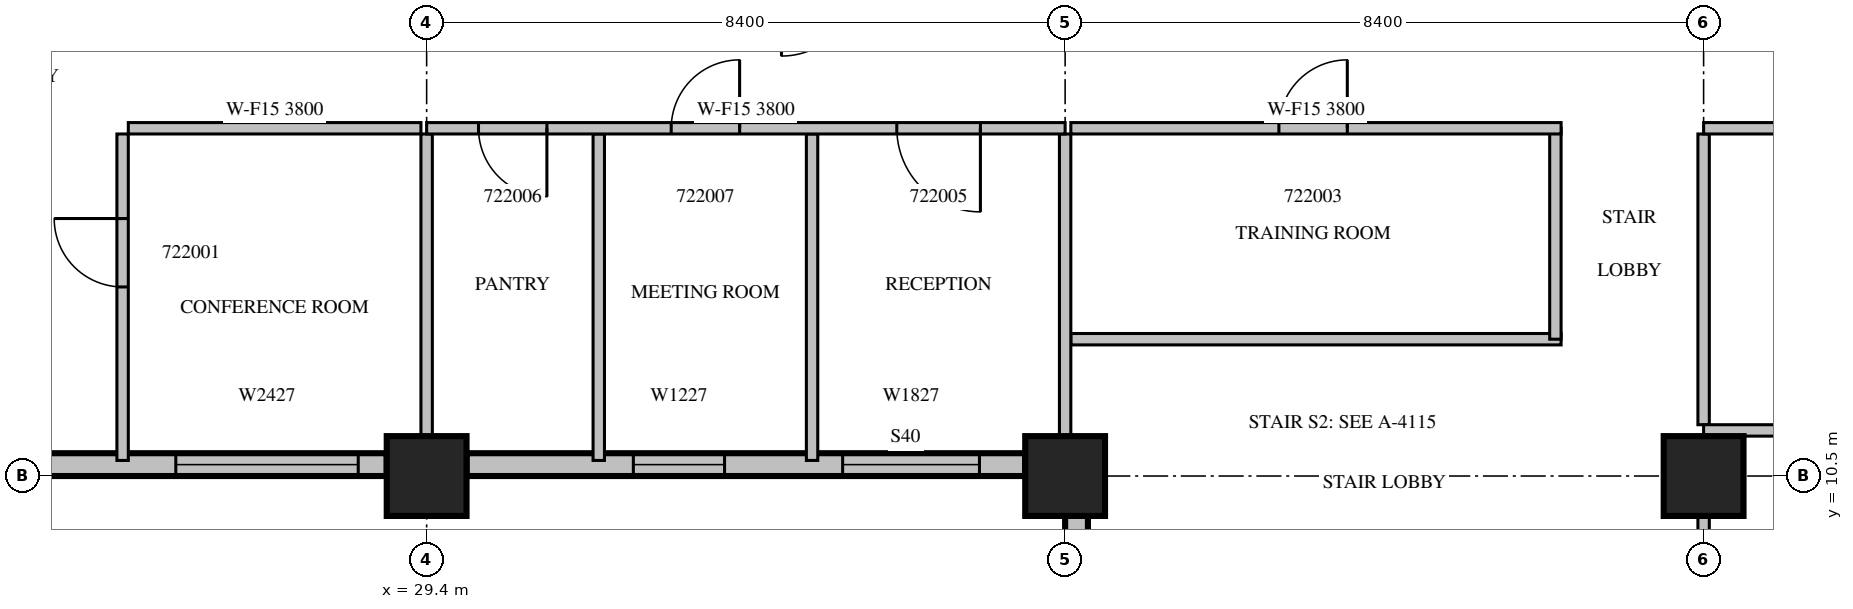
"""IFC4 building model, lengths in metres.
Left out: names, types, materials, properties, quantities, classifications, styles, units other than length and angle.
Written with IfcOpenShell. Run it as: python <this file> out.ifc"""

import sys

from ifc_helpers import new_model, si_unit, direction, frame, frame_2d, origin, origin_2d, place, context, subcontext, project, spatial, rectangle, extrude, source, transform, mapped, element, fill, save


model = new_model("IFC4")
c1 = context("Model", 3, precision=1e-05, world=origin(), true_north=direction((0.0, 1.0)))
c2 = subcontext(c1, "Body", "Model", "MODEL_VIEW")
j1 = project(units=[si_unit("LENGTHUNIT", "METRE"), si_unit("PLANEANGLEUNIT", "RADIAN")], contexts=[c1])
p1 = place(None, origin())
s1 = spatial("IfcSite", under=j1, at=p1, CompositionType="ELEMENT")
p2 = place(p1, origin())
s2 = spatial("IfcBuilding", under=s1, at=p2, CompositionType="ELEMENT")
p3 = place(p2, frame((0.0, 0.0, 103.5)))
s3 = spatial("IfcBuildingStorey", under=s2, at=p3, CompositionType="ELEMENT", Elevation=103.5)
m1 = source(origin(), c2, "Body", "SweptSolid", [
    extrude(rectangle(XDim=1.05, YDim=1.05, at=origin_2d()), origin(), (0.0, 0.0, 1.0), 4.2),
])
for number, where, z_axis, x_axis in (
    (1, (29.4, 10.5, 0.0), (0.0, 0.0, 1.0), (1.0, 0.0, 0.0)),
    (2, (37.8, 10.5, 0.0), (0.0, 0.0, 1.0), (1.0, 0.0, 0.0)),
    (3, (46.2, 10.5, 0.0), (0.0, 0.0, 1.0), (1.0, 0.0, 0.0)),
):
    element("IfcColumn", number, at=place(p3, frame(where, z_axis=z_axis, x_axis=x_axis)), inside=s3, PredefinedType="COLUMN", context=c2, shape_type="MappedRepresentation", body=[
        mapped(m1, transform((0.0, 0.0, 0.0), scale=1.0)),
    ])
p4 = place(p3, frame((22.0, 10.65, 0.0), z_axis=(0.0, 0.0, 1.0), x_axis=(1.0, 0.0, 0.0)))
e4 = element("IfcWall", 4, at=p4, inside=s3, PredefinedType="STANDARD", context=c2, shape_type="SweptSolid", body=[
    extrude(rectangle(XDim=6.875, YDim=0.3, at=frame_2d((3.438, 0.0))), origin(), (0.0, 0.0, 1.0), 3.8),
])
m2 = source(origin(), c2, "Body", "SweptSolid", [
    extrude(rectangle(XDim=1.8, YDim=2.7, at=frame_2d((0.9, 1.35))), frame((0.0, 0.16, 0.0), z_axis=(0.0, -1.0, 0.0), x_axis=(1.0, 0.0, 0.0)), (0.0, 0.0, 1.0), 0.32),
])
p5 = place(p4, frame((0.2, 0.0, 0.6)))
e5 = element("IfcOpeningElement", 5, at=p5, cuts=e4, PredefinedType="OPENING", context=c2, shape_type="MappedRepresentation", body=[
    mapped(m2, transform((0.0, 0.0, 0.0), scale=1.0)),
])
m3 = source(origin(), c2, "Body", "SweptSolid", [
    extrude(rectangle(XDim=2.4, YDim=2.7, at=frame_2d((1.2, 1.35))), frame((0.0, 0.16, 0.0), z_axis=(0.0, -1.0, 0.0), x_axis=(1.0, 0.0, 0.0)), (0.0, 0.0, 1.0), 0.32),
])
p6 = place(p4, frame((4.1, 0.0, 0.6)))
e6 = element("IfcOpeningElement", 6, at=p6, cuts=e4, PredefinedType="OPENING", context=c2, shape_type="MappedRepresentation", body=[
    mapped(m3, transform((0.0, 0.0, 0.0), scale=1.0)),
])
m4 = source(origin(), c2, "Body", "SweptSolid", [
    extrude(rectangle(XDim=7.35, YDim=0.3, at=frame_2d((3.675, 0.0))), origin(), (0.0, 0.0, 1.0), 3.8),
])
p7 = place(p3, frame((29.925, 10.65, 0.0), z_axis=(0.0, 0.0, 1.0), x_axis=(1.0, 0.0, 0.0)))
e7 = element("IfcWall", 7, at=p7, inside=s3, PredefinedType="STANDARD", context=c2, shape_type="MappedRepresentation", body=[
    mapped(m4, transform((0.0, 0.0, 0.0), scale=1.0)),
])
p8 = place(p7, frame((4.948, 0.0, 0.6)))
e8 = element("IfcOpeningElement", 8, at=p8, cuts=e7, PredefinedType="OPENING", context=c2, shape_type="MappedRepresentation", body=[
    mapped(m2, transform((0.0, 0.0, 0.0), scale=1.0)),
])
m5 = source(origin(), c2, "Body", "SweptSolid", [
    extrude(rectangle(XDim=1.2, YDim=2.7, at=frame_2d((0.6, 1.35))), frame((0.0, 0.16, 0.0), z_axis=(0.0, -1.0, 0.0), x_axis=(1.0, 0.0, 0.0)), (0.0, 0.0, 1.0), 0.32),
])
p9 = place(p7, frame((2.195, 0.0, 0.6)))
e9 = element("IfcOpeningElement", 9, at=p9, cuts=e7, PredefinedType="OPENING", context=c2, shape_type="MappedRepresentation", body=[
    mapped(m5, transform((0.0, 0.0, 0.0), scale=1.0)),
])
m6 = source(origin(), c2, "Body", "SweptSolid", [
    extrude(rectangle(XDim=8.925, YDim=0.3, at=frame_2d((4.463, 0.0))), origin(), (0.0, 0.0, 1.0), 3.8),
])
p10 = place(p3, frame((37.95, 9.975, 0.0), z_axis=(0.0, 0.0, 1.0), x_axis=(0.0, -1.0, 0.0)))
e10 = element("IfcWall", 10, at=p10, inside=s3, PredefinedType="STANDARD", context=c2, shape_type="MappedRepresentation", body=[
    mapped(m6, transform((0.0, 0.0, 0.0), scale=1.0)),
])
p11 = place(p10, frame((1.887, 0.0, 0.6)))
e11 = element("IfcOpeningElement", 11, at=p11, cuts=e10, PredefinedType="OPENING", context=c2, shape_type="MappedRepresentation", body=[
    mapped(m2, transform((0.0, 0.0, 0.0), scale=1.0)),
])
p12 = place(p10, frame((6.15, 0.0, 0.6)))
e12 = element("IfcOpeningElement", 12, at=p12, cuts=e10, PredefinedType="OPENING", context=c2, shape_type="MappedRepresentation", body=[
    mapped(m3, transform((0.0, 0.0, 0.0), scale=1.0)),
])
m7 = source(origin(), c2, "Body", "SweptSolid", [
    extrude(rectangle(XDim=4.295, YDim=0.15, at=frame_2d((2.147, 0.0))), origin(), (0.0, 0.0, 1.0), 3.8),
])
p13 = place(p3, frame((25.4, 15.0, 0.0), z_axis=(0.0, 0.0, 1.0), x_axis=(0.0, -1.0, 0.0)))
e13 = element("IfcWall", 13, at=p13, inside=s3, PredefinedType="PARTITIONING", context=c2, shape_type="MappedRepresentation", body=[
    mapped(m7, transform((0.0, 0.0, 0.0), scale=1.0)),
])
m8 = source(origin(), c2, "Body", "SweptSolid", [
    extrude(rectangle(XDim=0.9, YDim=2.1, at=frame_2d((0.45, 1.05))), frame((0.0, 0.085, 0.0), z_axis=(0.0, -1.0, 0.0), x_axis=(1.0, 0.0, 0.0)), (0.0, 0.0, 1.0), 0.17),
])
p14 = place(p13, frame((1.113, 0.0, 0.0)))
e14 = element("IfcOpeningElement", 14, at=p14, cuts=e13, PredefinedType="OPENING", context=c2, shape_type="MappedRepresentation", body=[
    mapped(m8, transform((0.0, 0.0, 0.0), scale=1.0)),
])
p15 = place(p3, frame((29.325, 15.075, 0.0), z_axis=(0.0, 0.0, 1.0), x_axis=(-1.0, 0.0, 0.0)))
e15 = element("IfcWall", 15, at=p15, inside=s3, PredefinedType="PARTITIONING", context=c2, shape_type="SweptSolid", body=[
    extrude(rectangle(XDim=3.85, YDim=0.15, at=frame_2d((1.925, 0.0))), origin(), (0.0, 0.0, 1.0), 3.8),
])
p16 = place(p3, frame((29.4, 11.024, 0.0), z_axis=(0.0, 0.0, 1.0), x_axis=(0.0, 1.0, 0.0)))
e16 = element("IfcWall", 16, at=p16, inside=s3, PredefinedType="PARTITIONING", context=c2, shape_type="SweptSolid", body=[
    extrude(rectangle(XDim=3.976, YDim=0.15, at=frame_2d((1.988, 0.0))), origin(), (0.0, 0.0, 1.0), 3.8),
])
m9 = source(origin(), c2, "Body", "SweptSolid", [
    extrude(rectangle(XDim=6.45, YDim=0.15, at=frame_2d((3.225, 0.0))), origin(), (0.0, 0.0, 1.0), 3.8),
])
p17 = place(p3, frame((37.875, 12.3, 0.0), z_axis=(0.0, 0.0, 1.0), x_axis=(1.0, 0.0, 0.0)))
e17 = element("IfcWall", 17, at=p17, inside=s3, PredefinedType="PARTITIONING", context=c2, shape_type="MappedRepresentation", body=[
    mapped(m9, transform((0.0, 0.0, 0.0), scale=1.0)),
])
m10 = source(origin(), c2, "Body", "SweptSolid", [
    extrude(rectangle(XDim=2.775, YDim=0.15, at=frame_2d((1.387, 0.0))), origin(), (0.0, 0.0, 1.0), 3.8),
])
p18 = place(p3, frame((44.25, 12.3, 0.0), z_axis=(0.0, 0.0, 1.0), x_axis=(0.0, 1.0, 0.0)))
e18 = element("IfcWall", 18, at=p18, inside=s3, PredefinedType="PARTITIONING", context=c2, shape_type="MappedRepresentation", body=[
    mapped(m10, transform((0.0, 0.0, 0.0), scale=1.0)),
])
p19 = place(p3, frame((44.325, 15.075, 0.0), z_axis=(0.0, 0.0, 1.0), x_axis=(-1.0, 0.0, 0.0)))
e19 = element("IfcWall", 19, at=p19, inside=s3, PredefinedType="PARTITIONING", context=c2, shape_type="MappedRepresentation", body=[
    mapped(m9, transform((0.0, 0.0, 0.0), scale=1.0)),
])
p20 = place(p19, frame((2.812, 0.0, 0.0)))
e20 = element("IfcOpeningElement", 20, at=p20, cuts=e19, PredefinedType="OPENING", context=c2, shape_type="MappedRepresentation", body=[
    mapped(m8, transform((0.0, 0.0, 0.0), scale=1.0)),
])
for number, where, z_axis, x_axis in (
    (21, (31.665, 10.705, 0.0), (0.0, 0.0, 1.0), (0.0, 1.0, 0.0)),
    (22, (34.471, 10.705, 0.0), (0.0, 0.0, 1.0), (0.0, 1.0, 0.0)),
):
    element("IfcWall", number, at=place(p3, frame(where, z_axis=z_axis, x_axis=x_axis)), inside=s3, PredefinedType="PARTITIONING", context=c2, shape_type="MappedRepresentation", body=[
        mapped(m7, transform((0.0, 0.0, 0.0), scale=1.0)),
    ])
m11 = source(origin(), c2, "Body", "SweptSolid", [
    extrude(rectangle(XDim=3.976, YDim=0.15, at=frame_2d((1.988, 0.0))), origin(), (0.0, 0.0, 1.0), 3.8),
])
p21 = place(p3, frame((37.8, 11.024, 0.0), z_axis=(0.0, 0.0, 1.0), x_axis=(0.0, 1.0, 0.0)))
e23 = element("IfcWall", 23, at=p21, inside=s3, PredefinedType="PARTITIONING", context=c2, shape_type="MappedRepresentation", body=[
    mapped(m11, transform((0.0, 0.0, 0.0), scale=1.0)),
])
m12 = source(origin(), c2, "Body", "SweptSolid", [
    extrude(rectangle(XDim=8.927, YDim=0.15, at=frame_2d((4.463, 0.0))), origin(), (0.0, 0.0, 1.0), 3.8),
])
p22 = place(p3, frame((46.2, 1.049, 0.0), z_axis=(0.0, 0.0, 1.0), x_axis=(0.0, 1.0, 0.0)))
e24 = element("IfcWall", 24, at=p22, inside=s3, PredefinedType="PARTITIONING", context=c2, shape_type="MappedRepresentation", body=[
    mapped(m12, transform((0.0, 0.0, 0.0), scale=1.0)),
])
m13 = source(origin(), c2, "Body", "SweptSolid", [
    extrude(rectangle(XDim=3.825, YDim=0.15, at=frame_2d((1.913, 0.0))), origin(), (0.0, 0.0, 1.0), 3.8),
])
p23 = place(p3, frame((46.2, 11.175, 0.0), z_axis=(0.0, 0.0, 1.0), x_axis=(0.0, 1.0, 0.0)))
e25 = element("IfcWall", 25, at=p23, inside=s3, PredefinedType="PARTITIONING", context=c2, shape_type="MappedRepresentation", body=[
    mapped(m13, transform((0.0, 0.0, 0.0), scale=1.0)),
])
m14 = source(origin(), c2, "Body", "SweptSolid", [
    extrude(rectangle(XDim=24.9, YDim=0.15, at=frame_2d((12.45, 0.0))), origin(), (0.0, 0.0, 1.0), 3.8),
])
p24 = place(p3, frame((71.1, 11.1, 0.0), z_axis=(0.0, 0.0, 1.0), x_axis=(-1.0, 0.0, 0.0)))
e26 = element("IfcWall", 26, at=p24, inside=s3, PredefinedType="PARTITIONING", context=c2, shape_type="MappedRepresentation", body=[
    mapped(m14, transform((0.0, 0.0, 0.0), scale=1.0)),
])
p25 = place(p24, frame((21.51, 0.0, 0.0)))
e27 = element("IfcOpeningElement", 27, at=p25, cuts=e26, PredefinedType="OPENING", context=c2, shape_type="MappedRepresentation", body=[
    mapped(m8, transform((0.0, 0.0, 0.0), scale=1.0)),
])
p26 = place(p24, frame((15.63, 0.0, 0.0)))
e28 = element("IfcOpeningElement", 28, at=p26, cuts=e26, PredefinedType="OPENING", context=c2, shape_type="MappedRepresentation", body=[
    mapped(m8, transform((0.0, 0.0, 0.0), scale=1.0)),
])
m15 = source(origin(), c2, "Body", "SweptSolid", [
    extrude(rectangle(XDim=1.1, YDim=2.1, at=frame_2d((0.55, 1.05))), frame((0.0, 0.085, 0.0), z_axis=(0.0, -1.0, 0.0), x_axis=(1.0, 0.0, 0.0)), (0.0, 0.0, 1.0), 0.17),
])
p27 = place(p24, frame((10.692, 0.0, 0.0)))
e29 = element("IfcOpeningElement", 29, at=p27, cuts=e26, PredefinedType="OPENING", context=c2, shape_type="MappedRepresentation", body=[
    mapped(m15, transform((0.0, 0.0, 0.0), scale=1.0)),
])
m16 = source(origin(), c2, "Body", "SweptSolid", [
    extrude(rectangle(XDim=8.4, YDim=0.15, at=frame_2d((4.2, 0.0))), origin(), (0.0, 0.0, 1.0), 3.8),
])
p28 = place(p3, frame((37.8, 15.075, 0.0), z_axis=(0.0, 0.0, 1.0), x_axis=(-1.0, 0.0, 0.0)))
e30 = element("IfcWall", 30, at=p28, inside=s3, PredefinedType="PARTITIONING", context=c2, shape_type="MappedRepresentation", body=[
    mapped(m16, transform((0.0, 0.0, 0.0), scale=1.0)),
])
p29 = place(p28, frame((1.115, 0.0, 0.0)))
e31 = element("IfcOpeningElement", 31, at=p29, cuts=e30, PredefinedType="OPENING", context=c2, shape_type="MappedRepresentation", body=[
    mapped(m15, transform((0.0, 0.0, 0.0), scale=1.0)),
])
p30 = place(p28, frame((6.818, 0.0, 0.0)))
e32 = element("IfcOpeningElement", 32, at=p30, cuts=e30, PredefinedType="OPENING", context=c2, shape_type="MappedRepresentation", body=[
    mapped(m8, transform((0.0, 0.0, 0.0), scale=1.0)),
])
p31 = place(p28, frame((4.282, 0.0, 0.0)))
e33 = element("IfcOpeningElement", 33, at=p31, cuts=e30, PredefinedType="OPENING", context=c2, shape_type="MappedRepresentation", body=[
    mapped(m8, transform((0.0, 0.0, 0.0), scale=1.0)),
])
p32 = place(p3, frame((71.1, 15.075, 0.0), z_axis=(0.0, 0.0, 1.0), x_axis=(-1.0, 0.0, 0.0)))
e34 = element("IfcWall", 34, at=p32, inside=s3, PredefinedType="PARTITIONING", context=c2, shape_type="MappedRepresentation", body=[
    mapped(m14, transform((0.0, 0.0, 0.0), scale=1.0)),
])
m17 = source(origin(), c2, "Body", "SweptSolid", [
    extrude(rectangle(XDim=1.2, YDim=2.1, at=frame_2d((0.6, 1.05))), frame((0.0, 0.085, 0.0), z_axis=(0.0, -1.0, 0.0), x_axis=(1.0, 0.0, 0.0)), (0.0, 0.0, 1.0), 0.17),
])
p33 = place(p32, frame((18.42, 0.0, 0.0)))
e35 = element("IfcOpeningElement", 35, at=p33, cuts=e34, PredefinedType="OPENING", context=c2, shape_type="MappedRepresentation", body=[
    mapped(m17, transform((0.0, 0.0, 0.0), scale=1.0)),
])
p34 = place(p32, frame((10.967, 0.0, 0.0)))
e36 = element("IfcOpeningElement", 36, at=p34, cuts=e34, PredefinedType="OPENING", context=c2, shape_type="MappedRepresentation", body=[
    mapped(m15, transform((0.0, 0.0, 0.0), scale=1.0)),
])
p35 = place(p32, frame((8.127, 0.0, 0.0)))
e37 = element("IfcOpeningElement", 37, at=p35, cuts=e34, PredefinedType="OPENING", context=c2, shape_type="MappedRepresentation", body=[
    mapped(m8, transform((0.0, 0.0, 0.0), scale=1.0)),
])
p36 = place(p32, frame((4.631, 0.0, 0.0)))
e38 = element("IfcOpeningElement", 38, at=p36, cuts=e34, PredefinedType="OPENING", context=c2, shape_type="MappedRepresentation", body=[
    mapped(m8, transform((0.0, 0.0, 0.0), scale=1.0)),
])
p37 = place(p32, frame((0.964, 0.0, 0.0)))
e39 = element("IfcOpeningElement", 39, at=p37, cuts=e34, PredefinedType="OPENING", context=c2, shape_type="MappedRepresentation", body=[
    mapped(m8, transform((0.0, 0.0, 0.0), scale=1.0)),
])
m18 = source(origin(), c2, "Body", "SweptSolid", [
    extrude(rectangle(XDim=2.4, YDim=2.7, at=frame_2d((1.2, 1.35))), frame((0.0, 0.03, 0.0), z_axis=(0.0, -1.0, 0.0), x_axis=(1.0, 0.0, 0.0)), (0.0, 0.0, 1.0), 0.06),
])
p38 = place(p6, origin())
e40 = element("IfcWindow", 40, at=p38, inside=s3, PartitioningType="SINGLE_PANEL", PredefinedType="WINDOW", context=c2, shape_type="MappedRepresentation", body=[
    mapped(m18, transform((0.0, 0.0, 0.0), scale=1.0)),
])
fill(e6, e40)
m19 = source(origin(), c2, "Body", "SweptSolid", [
    extrude(rectangle(XDim=1.8, YDim=2.7, at=frame_2d((0.9, 1.35))), frame((0.0, 0.03, 0.0), z_axis=(0.0, -1.0, 0.0), x_axis=(1.0, 0.0, 0.0)), (0.0, 0.0, 1.0), 0.06),
])
p39 = place(p8, origin())
e41 = element("IfcWindow", 41, at=p39, inside=s3, PartitioningType="SINGLE_PANEL", PredefinedType="WINDOW", context=c2, shape_type="MappedRepresentation", body=[
    mapped(m19, transform((0.0, 0.0, 0.0), scale=1.0)),
])
fill(e8, e41)
m20 = source(origin(), c2, "Body", "SweptSolid", [
    extrude(rectangle(XDim=1.2, YDim=2.7, at=frame_2d((0.6, 1.35))), frame((0.0, 0.03, 0.0), z_axis=(0.0, -1.0, 0.0), x_axis=(1.0, 0.0, 0.0)), (0.0, 0.0, 1.0), 0.06),
])
p40 = place(p9, origin())
e42 = element("IfcWindow", 42, at=p40, inside=s3, PartitioningType="SINGLE_PANEL", PredefinedType="WINDOW", context=c2, shape_type="MappedRepresentation", body=[
    mapped(m20, transform((0.0, 0.0, 0.0), scale=1.0)),
])
fill(e9, e42)
m21 = source(origin(), c2, "Body", "SweptSolid", [
    extrude(rectangle(XDim=0.9, YDim=2.1, at=frame_2d((0.45, 1.05))), frame((0.0, 0.025, 0.0), z_axis=(0.0, -1.0, 0.0), x_axis=(1.0, 0.0, 0.0)), (0.0, 0.0, 1.0), 0.05),
])
p41 = place(p14, origin())
e43 = element("IfcDoor", 43, at=p41, inside=s3, OperationType="SINGLE_SWING_RIGHT", PredefinedType="DOOR", context=c2, shape_type="MappedRepresentation", body=[
    mapped(m21, transform((0.0, 0.0, 0.0), scale=1.0)),
])
fill(e14, e43)
p42 = place(p20, origin())
e44 = element("IfcDoor", 44, at=p42, inside=s3, OperationType="SINGLE_SWING_RIGHT", PredefinedType="DOOR", context=c2, shape_type="MappedRepresentation", body=[
    mapped(m21, transform((0.0, 0.0, 0.0), scale=1.0)),
])
fill(e20, e44)
m22 = source(origin(), c2, "Body", "SweptSolid", [
    extrude(rectangle(XDim=1.1, YDim=2.1, at=frame_2d((0.55, 1.05))), frame((0.0, 0.025, 0.0), z_axis=(0.0, -1.0, 0.0), x_axis=(1.0, 0.0, 0.0)), (0.0, 0.0, 1.0), 0.05),
])
p43 = place(p29, origin())
e45 = element("IfcDoor", 45, at=p43, inside=s3, OperationType="SINGLE_SWING_LEFT", PredefinedType="DOOR", context=c2, shape_type="MappedRepresentation", body=[
    mapped(m22, transform((0.0, 0.0, 0.0), scale=1.0)),
])
fill(e31, e45)
p44 = place(p30, origin())
e46 = element("IfcDoor", 46, at=p44, inside=s3, OperationType="SINGLE_SWING_LEFT", PredefinedType="DOOR", context=c2, shape_type="MappedRepresentation", body=[
    mapped(m21, transform((0.0, 0.0, 0.0), scale=1.0)),
])
fill(e32, e46)
p45 = place(p31, origin())
e47 = element("IfcDoor", 47, at=p45, inside=s3, OperationType="SINGLE_SWING_RIGHT", PredefinedType="DOOR", context=c2, shape_type="MappedRepresentation", body=[
    mapped(m21, transform((0.0, 0.0, 0.0), scale=1.0)),
])
fill(e33, e47)
save(model, sys.argv[1])
